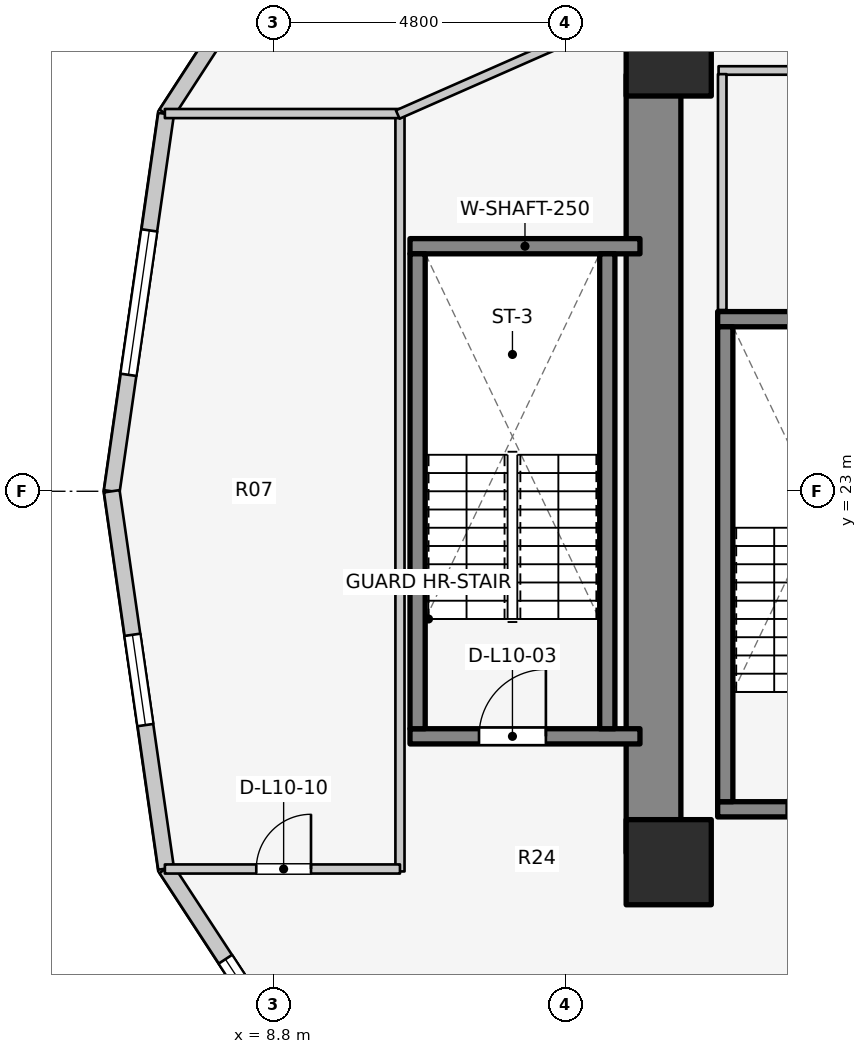
"""IFC4 building model, lengths in metres.
Left out: names, types, materials, properties, quantities, classifications, styles, units other than length and angle.
Written with IfcOpenShell. Run it as: python <this file> out.ifc"""

import sys

from ifc_helpers import new_model, si_unit, direction, frame, frame_2d, origin, origin_2d, place, context, subcontext, project, spatial, rectangle, extrude, element, fill, save


model = new_model("IFC4")
c1 = context("Model", 3, precision=1e-05, world=origin(), true_north=direction((0.0, 1.0)))
c2 = subcontext(c1, "Body", "Model", "MODEL_VIEW")
j1 = project(units=[si_unit("LENGTHUNIT", "METRE"), si_unit("PLANEANGLEUNIT", "RADIAN")], contexts=[c1])
p1 = place(None, origin())
s1 = spatial("IfcSite", under=j1, at=p1, CompositionType="ELEMENT")
p2 = place(p1, origin())
s2 = spatial("IfcBuilding", under=s1, at=p2, CompositionType="ELEMENT")
p3 = place(p2, frame((0.0, 0.0, 36.9)))
s3 = spatial("IfcBuildingStorey", under=s2, at=p3, CompositionType="ELEMENT", Elevation=36.9)
p4 = place(p3, frame((15.05, 17.05, 0.0), z_axis=(0.0, 0.0, 1.0), x_axis=(0.0, 1.0, 0.0)))
e1 = element("IfcWall", 1, at=p4, inside=s3, PredefinedType="SHEAR", context=c2, shape_type="SweptSolid", body=[
    extrude(rectangle(XDim=12.8, YDim=0.9, at=frame_2d((6.4, 0.0))), origin(), (0.0, 0.0, 1.0), 3.1),
])
p5 = place(p3, frame((16.105, 17.77, 0.0), z_axis=(0.0, 0.0, 1.0), x_axis=(1.0, 0.0, 0.0)))
e2 = element("IfcWall", 2, at=p5, inside=s3, PredefinedType="SOLIDWALL", context=c2, shape_type="SweptSolid", body=[
    extrude(rectangle(XDim=3.37, YDim=0.25, at=frame_2d((1.685, 0.0))), origin(), (0.0, 0.0, 1.0), 3.1),
])
p6 = place(p5, frame((1.135, 0.0, 0.0)))
e3 = element("IfcOpeningElement", 3, at=p6, cuts=e2, PredefinedType="OPENING", context=c2, shape_type="SweptSolid", body=[
    extrude(rectangle(XDim=1.1, YDim=2.1, at=frame_2d((0.55, 1.05))), frame((0.0, 0.135, 0.0), z_axis=(0.0, -1.0, 0.0), x_axis=(1.0, 0.0, 0.0)), (0.0, 0.0, 1.0), 0.27),
])
p7 = place(p3, frame((16.105, 25.83, 0.0), z_axis=(0.0, 0.0, 1.0), x_axis=(1.0, 0.0, 0.0)))
e4 = element("IfcWall", 4, at=p7, inside=s3, PredefinedType="SOLIDWALL", context=c2, shape_type="SweptSolid", body=[
    extrude(rectangle(XDim=3.37, YDim=0.25, at=frame_2d((1.685, 0.0))), origin(), (0.0, 0.0, 1.0), 3.1),
])
p8 = place(p3, frame((16.23, 17.895, 0.0), z_axis=(0.0, 0.0, 1.0), x_axis=(0.0, 1.0, 0.0)))
e5 = element("IfcWall", 5, at=p8, inside=s3, PredefinedType="SOLIDWALL", context=c2, shape_type="SweptSolid", body=[
    extrude(rectangle(XDim=7.81, YDim=0.25, at=frame_2d((3.905, 0.0))), origin(), (0.0, 0.0, 1.0), 3.1),
])
p9 = place(p3, frame((11.045, 18.97, 0.0), z_axis=(0.0, 0.0, 1.0), x_axis=(1.0, 0.0, 0.0)))
e6 = element("IfcWall", 6, at=p9, inside=s3, PredefinedType="SOLIDWALL", context=c2, shape_type="SweptSolid", body=[
    extrude(rectangle(XDim=3.782, YDim=0.25, at=frame_2d((1.891, 0.0))), origin(), (0.0, 0.0, 1.0), 3.1),
])
p10 = place(p9, frame((1.135, 0.0, 0.0)))
e7 = element("IfcOpeningElement", 7, at=p10, cuts=e6, PredefinedType="OPENING", context=c2, shape_type="SweptSolid", body=[
    extrude(rectangle(XDim=1.1, YDim=2.1, at=frame_2d((0.55, 1.05))), frame((0.0, 0.135, 0.0), z_axis=(0.0, -1.0, 0.0), x_axis=(1.0, 0.0, 0.0)), (0.0, 0.0, 1.0), 0.27),
])
p11 = place(p3, frame((11.045, 27.03, 0.0), z_axis=(0.0, 0.0, 1.0), x_axis=(1.0, 0.0, 0.0)))
e8 = element("IfcWall", 8, at=p11, inside=s3, PredefinedType="SOLIDWALL", context=c2, shape_type="SweptSolid", body=[
    extrude(rectangle(XDim=3.782, YDim=0.25, at=frame_2d((1.891, 0.0))), origin(), (0.0, 0.0, 1.0), 3.1),
])
for number, where, z_axis, x_axis in (
    (9, (11.17, 19.095, 0.0), (0.0, 0.0, 1.0), (0.0, 1.0, 0.0)),
    (10, (14.29, 19.095, 0.0), (0.0, 0.0, 1.0), (0.0, 1.0, 0.0)),
):
    element("IfcWall", number, at=place(p3, frame(where, z_axis=z_axis, x_axis=x_axis)), inside=s3, PredefinedType="SOLIDWALL", context=c2, shape_type="SweptSolid", body=[
        extrude(rectangle(XDim=7.81, YDim=0.25, at=frame_2d((3.905, 0.0))), origin(), (0.0, 0.0, 1.0), 3.1),
    ])
for number, where, z_axis, x_axis in (
    (11, (15.3, 16.9, 0.0), (0.0, 0.0, 1.0), (1.0, 0.0, 0.0)),
    (12, (15.3, 30.2, 0.0), (0.0, 0.0, 1.0), (1.0, 0.0, 0.0)),
):
    element("IfcColumn", number, at=place(p3, frame(where, z_axis=z_axis, x_axis=x_axis)), inside=s3, PredefinedType="COLUMN", context=c2, shape_type="SweptSolid", body=[
        extrude(rectangle(XDim=1.4, YDim=1.4, at=origin_2d()), origin(), (0.0, 0.0, 1.0), 3.1),
    ])
p12 = place(p3, frame((9.806, 33.476, 0.0), z_axis=(0.0, 0.0, 1.0), x_axis=(-0.544578722263, -0.838709732421, 0.0)))
e13 = element("IfcWall", 13, at=p12, inside=s3, PredefinedType="STANDARD", context=c2, shape_type="SweptSolid", body=[
    extrude(rectangle(XDim=5.092, YDim=0.26, at=frame_2d((2.546, 0.0))), origin(), (0.0, 0.0, 1.0), 2.85),
])
p13 = place(p12, frame((1.796, 0.0, 0.75)))
e14 = element("IfcOpeningElement", 14, at=p13, cuts=e13, PredefinedType="OPENING", context=c2, shape_type="SweptSolid", body=[
    extrude(rectangle(XDim=1.5, YDim=1.6, at=frame_2d((0.75, 0.8))), frame((0.0, 0.14, 0.0), z_axis=(0.0, -1.0, 0.0), x_axis=(1.0, 0.0, 0.0)), (0.0, 0.0, 1.0), 0.28),
])
p14 = place(p3, frame((7.033, 29.205, 0.0), z_axis=(0.0, 0.0, 1.0), x_axis=(-0.142528001686, -0.989790770181, 0.0)))
e15 = element("IfcWall", 15, at=p14, inside=s3, PredefinedType="STANDARD", context=c2, shape_type="SweptSolid", body=[
    extrude(rectangle(XDim=6.269, YDim=0.26, at=frame_2d((3.135, 0.0))), origin(), (0.0, 0.0, 1.0), 2.85),
])
p15 = place(p14, frame((1.935, 0.0, 0.75)))
e16 = element("IfcOpeningElement", 16, at=p15, cuts=e15, PredefinedType="OPENING", context=c2, shape_type="SweptSolid", body=[
    extrude(rectangle(XDim=2.4, YDim=1.7, at=frame_2d((1.2, 0.85))), frame((0.0, 0.14, 0.0), z_axis=(0.0, -1.0, 0.0), x_axis=(1.0, 0.0, 0.0)), (0.0, 0.0, 1.0), 0.28),
])
p16 = place(p3, frame((6.14, 23.0, 0.0), z_axis=(0.0, 0.0, 1.0), x_axis=(0.142528001686, -0.989790770181, 0.0)))
e17 = element("IfcWall", 17, at=p16, inside=s3, PredefinedType="STANDARD", context=c2, shape_type="SweptSolid", body=[
    extrude(rectangle(XDim=6.269, YDim=0.26, at=frame_2d((3.135, 0.0))), origin(), (0.0, 0.0, 1.0), 2.85),
])
p17 = place(p16, frame((2.385, 0.0, 0.75)))
e18 = element("IfcOpeningElement", 18, at=p17, cuts=e17, PredefinedType="OPENING", context=c2, shape_type="SweptSolid", body=[
    extrude(rectangle(XDim=1.5, YDim=1.6, at=frame_2d((0.75, 0.8))), frame((0.0, 0.14, 0.0), z_axis=(0.0, -1.0, 0.0), x_axis=(1.0, 0.0, 0.0)), (0.0, 0.0, 1.0), 0.28),
])
p18 = place(p3, frame((7.033, 16.795, 0.0), z_axis=(0.0, 0.0, 1.0), x_axis=(0.547702757047, -0.836672988642, 0.0)))
e19 = element("IfcWall", 19, at=p18, inside=s3, PredefinedType="STANDARD", context=c2, shape_type="SweptSolid", body=[
    extrude(rectangle(XDim=5.062, YDim=0.26, at=frame_2d((2.531, 0.0))), origin(), (0.0, 0.0, 1.0), 2.85),
])
p19 = place(p18, frame((1.781, 0.0, 0.75)))
e20 = element("IfcOpeningElement", 20, at=p19, cuts=e19, PredefinedType="OPENING", context=c2, shape_type="SweptSolid", body=[
    extrude(rectangle(XDim=1.5, YDim=1.6, at=frame_2d((0.75, 0.8))), frame((0.0, 0.14, 0.0), z_axis=(0.0, -1.0, 0.0), x_axis=(1.0, 0.0, 0.0)), (0.0, 0.0, 1.0), 0.28),
])
p20 = place(p3, frame((16.12, 29.92, 0.0), z_axis=(0.0, 0.0, 1.0), x_axis=(1.0, 0.0, 0.0)))
e21 = element("IfcWall", 21, at=p20, inside=s3, PredefinedType="PLUMBINGWALL", context=c2, shape_type="SweptSolid", body=[
    extrude(rectangle(XDim=3.3, YDim=0.14, at=frame_2d((1.65, 0.0))), origin(), (0.0, 0.0, 1.0), 2.855),
])
p21 = place(p20, frame((1.516, 0.0, 0.0)))
e22 = element("IfcOpeningElement", 22, at=p21, cuts=e21, PredefinedType="OPENING", context=c2, shape_type="SweptSolid", body=[
    extrude(rectangle(XDim=0.85, YDim=2.05, at=frame_2d((0.425, 1.025))), frame((0.0, 0.08, 0.0), z_axis=(0.0, -1.0, 0.0), x_axis=(1.0, 0.0, 0.0)), (0.0, 0.0, 1.0), 0.16),
])
p22 = place(p3, frame((16.18, 25.98, 0.0), z_axis=(0.0, 0.0, 1.0), x_axis=(0.0, 1.0, 0.0)))
e23 = element("IfcWall", 23, at=p22, inside=s3, PredefinedType="PLUMBINGWALL", context=c2, shape_type="SweptSolid", body=[
    extrude(rectangle(XDim=3.88, YDim=0.14, at=frame_2d((1.94, 0.0))), origin(), (0.0, 0.0, 1.0), 2.855),
])
p23 = place(p3, frame((10.88, 16.748, 0.0), z_axis=(0.0, 0.0, 1.0), x_axis=(0.0, 1.0, 0.0)))
e24 = element("IfcWall", 24, at=p23, inside=s3, PredefinedType="PARTITIONING", context=c2, shape_type="SweptSolid", body=[
    extrude(rectangle(XDim=12.503, YDim=0.15, at=frame_2d((6.252, 0.0))), origin(), (0.0, 0.0, 1.0), 2.12),
])
p24 = place(p3, frame((7.014, 16.788, 0.0), z_axis=(0.0, 0.0, 1.0), x_axis=(1.0, 0.0, 0.0)))
e25 = element("IfcWall", 25, at=p24, inside=s3, PredefinedType="PARTITIONING", context=c2, shape_type="SweptSolid", body=[
    extrude(rectangle(XDim=3.866, YDim=0.15, at=frame_2d((1.933, 0.0))), origin(), (0.0, 0.0, 1.0), 2.855),
])
p25 = place(p24, frame((1.503, 0.0, 0.0)))
e26 = element("IfcOpeningElement", 26, at=p25, cuts=e25, PredefinedType="OPENING", context=c2, shape_type="SweptSolid", body=[
    extrude(rectangle(XDim=0.9, YDim=2.1, at=frame_2d((0.45, 1.05))), frame((0.0, 0.085, 0.0), z_axis=(0.0, -1.0, 0.0), x_axis=(1.0, 0.0, 0.0)), (0.0, 0.0, 1.0), 0.17),
])
p26 = place(p3, frame((7.014, 29.212, 0.0), z_axis=(0.0, 0.0, 1.0), x_axis=(1.0, 0.0, 0.0)))
e27 = element("IfcWall", 27, at=p26, inside=s3, PredefinedType="PARTITIONING", context=c2, shape_type="SweptSolid", body=[
    extrude(rectangle(XDim=3.866, YDim=0.15, at=frame_2d((1.933, 0.0))), origin(), (0.0, 0.0, 1.0), 2.855),
])
p27 = place(p3, frame((10.844, 29.196, 0.0), z_axis=(0.0, 0.0, 1.0), x_axis=(0.91502756289, 0.403391322604, 0.0)))
e28 = element("IfcWall", 28, at=p27, inside=s3, PredefinedType="PARTITIONING", context=c2, shape_type="SweptSolid", body=[
    extrude(rectangle(XDim=4.637, YDim=0.15, at=frame_2d((2.319, 0.0))), origin(), (0.0, 0.0, 1.0), 2.069),
])
p28 = place(p15, origin())
e29 = element("IfcWindow", 29, at=p28, inside=s3, PartitioningType="SINGLE_PANEL", PredefinedType="WINDOW", context=c2, shape_type="SweptSolid", body=[
    extrude(rectangle(XDim=2.4, YDim=1.7, at=frame_2d((1.2, 0.85))), frame((0.0, 0.03, 0.0), z_axis=(0.0, -1.0, 0.0), x_axis=(1.0, 0.0, 0.0)), (0.0, 0.0, 1.0), 0.06),
])
fill(e16, e29)
p29 = place(p17, origin())
e30 = element("IfcWindow", 30, at=p29, inside=s3, PartitioningType="SINGLE_PANEL", PredefinedType="WINDOW", context=c2, shape_type="SweptSolid", body=[
    extrude(rectangle(XDim=1.5, YDim=1.6, at=frame_2d((0.75, 0.8))), frame((0.0, 0.03, 0.0), z_axis=(0.0, -1.0, 0.0), x_axis=(1.0, 0.0, 0.0)), (0.0, 0.0, 1.0), 0.06),
])
fill(e18, e30)
p30 = place(p19, origin())
e31 = element("IfcWindow", 31, at=p30, inside=s3, PartitioningType="SINGLE_PANEL", PredefinedType="WINDOW", context=c2, shape_type="SweptSolid", body=[
    extrude(rectangle(XDim=1.5, YDim=1.6, at=frame_2d((0.75, 0.8))), frame((0.0, 0.03, 0.0), z_axis=(0.0, -1.0, 0.0), x_axis=(1.0, 0.0, 0.0)), (0.0, 0.0, 1.0), 0.06),
])
fill(e20, e31)
p31 = place(p6, origin())
e32 = element("IfcDoor", 32, at=p31, inside=s3, OperationType="SINGLE_SWING_RIGHT", PredefinedType="DOOR", context=c2, shape_type="SweptSolid", body=[
    extrude(rectangle(XDim=1.1, YDim=2.1, at=frame_2d((0.55, 1.05))), frame((0.0, 0.025, 0.0), z_axis=(0.0, -1.0, 0.0), x_axis=(1.0, 0.0, 0.0)), (0.0, 0.0, 1.0), 0.05),
])
fill(e3, e32)
p32 = place(p10, origin())
e33 = element("IfcDoor", 33, at=p32, inside=s3, OperationType="SINGLE_SWING_RIGHT", PredefinedType="DOOR", context=c2, shape_type="SweptSolid", body=[
    extrude(rectangle(XDim=1.1, YDim=2.1, at=frame_2d((0.55, 1.05))), frame((0.0, 0.025, 0.0), z_axis=(0.0, -1.0, 0.0), x_axis=(1.0, 0.0, 0.0)), (0.0, 0.0, 1.0), 0.05),
])
fill(e7, e33)
p33 = place(p25, origin())
e34 = element("IfcDoor", 34, at=p33, inside=s3, OperationType="SINGLE_SWING_RIGHT", PredefinedType="DOOR", context=c2, shape_type="SweptSolid", body=[
    extrude(rectangle(XDim=0.9, YDim=2.1, at=frame_2d((0.45, 1.05))), frame((0.0, 0.025, 0.0), z_axis=(0.0, -1.0, 0.0), x_axis=(1.0, 0.0, 0.0)), (0.0, 0.0, 1.0), 0.05),
])
fill(e26, e34)
save(model, sys.argv[1])
